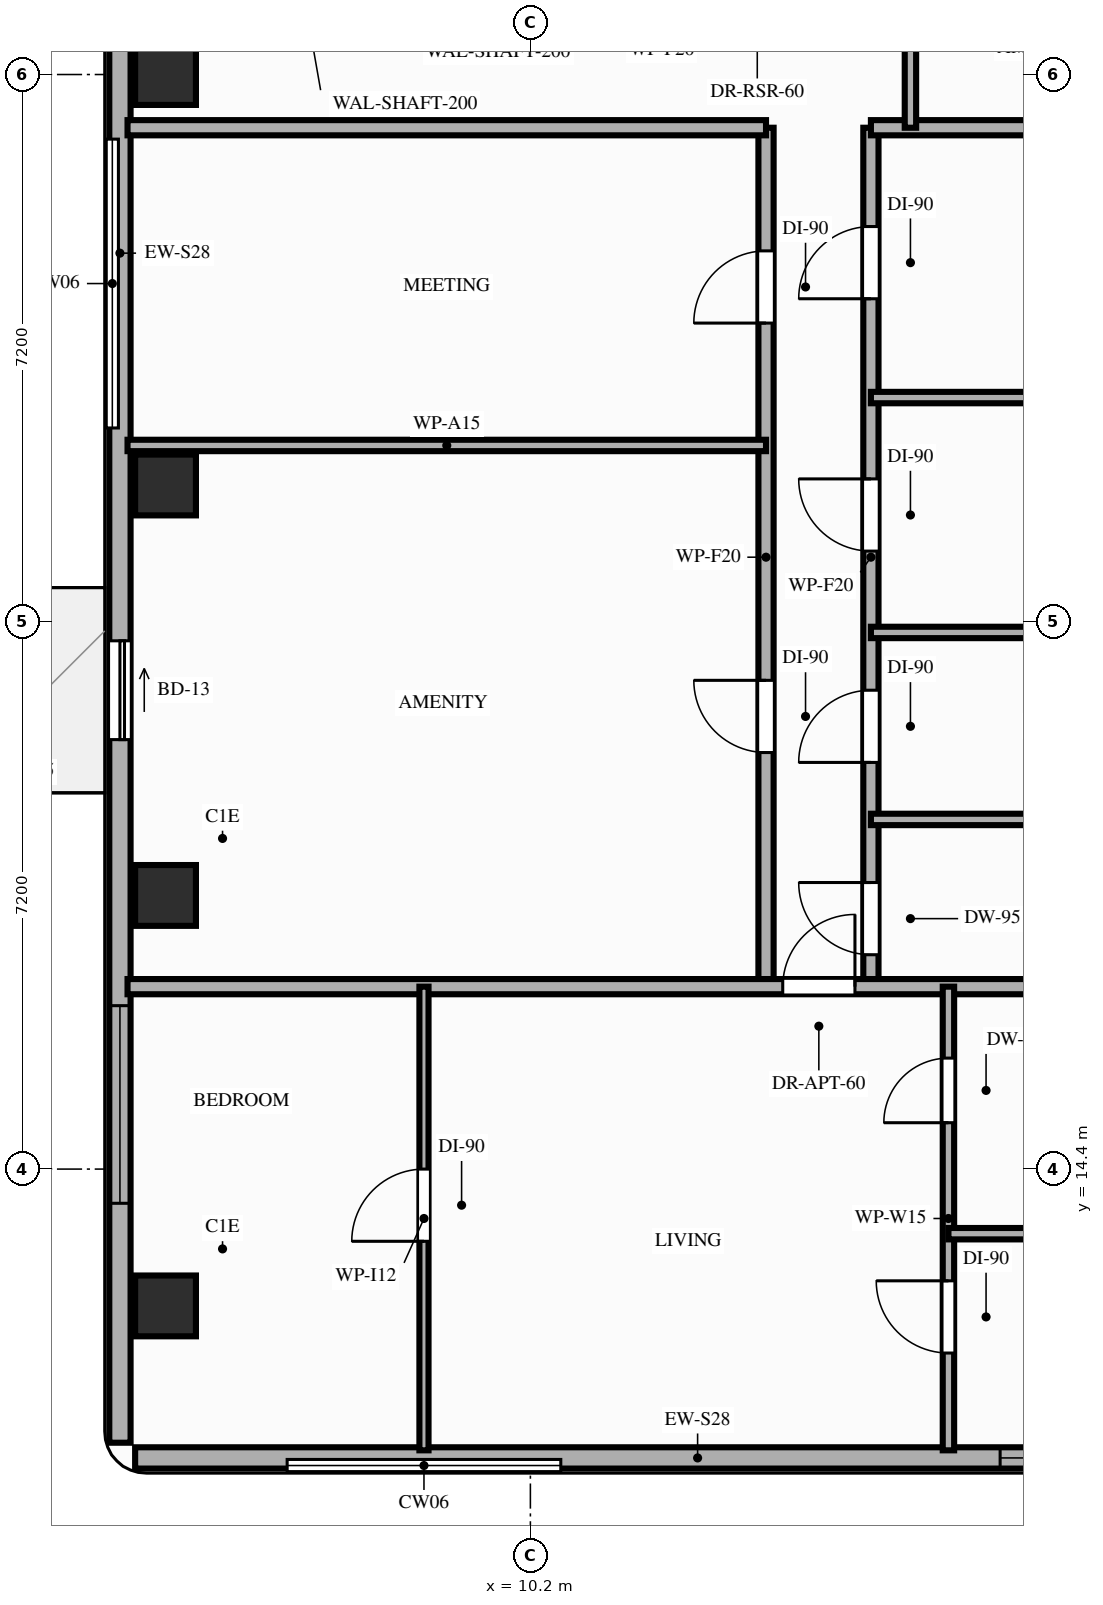
"""IFC4 building model, lengths in metres.
Left out: names, types, materials, properties, quantities, classifications, styles, units other than length and angle.
Written with IfcOpenShell. Run it as: python <this file> out.ifc"""

import sys

from ifc_helpers import new_model, si_unit, direction, frame, frame_2d, origin, origin_2d, place, context, subcontext, project, spatial, rectangle, extrude, element, fill, save


model = new_model("IFC4")
c1 = context("Model", 3, precision=1e-05, world=origin(), true_north=direction((0.0, 1.0)))
c2 = subcontext(c1, "Body", "Model", "MODEL_VIEW")
j1 = project(units=[si_unit("LENGTHUNIT", "METRE"), si_unit("PLANEANGLEUNIT", "RADIAN")], contexts=[c1])
p1 = place(None, origin())
s1 = spatial("IfcSite", under=j1, at=p1, CompositionType="ELEMENT")
p2 = place(p1, origin())
s2 = spatial("IfcBuilding", under=s1, at=p2, CompositionType="ELEMENT")
p3 = place(p2, frame((0.0, 0.0, 240.8)))
s3 = spatial("IfcBuildingStorey", under=s2, at=p3, CompositionType="ELEMENT", Elevation=240.8)
for number, where, z_axis, x_axis in (
    (1, (5.4, 12.6, 0.0), (0.0, 0.0, 1.0), (1.0, 0.0, 0.0)),
    (2, (5.4, 18.0, 0.0), (0.0, 0.0, 1.0), (1.0, 0.0, 0.0)),
    (3, (5.4, 23.4, 0.0), (0.0, 0.0, 1.0), (1.0, 0.0, 0.0)),
    (4, (5.4, 28.8, 0.0), (0.0, 0.0, 1.0), (1.0, 0.0, 0.0)),
):
    element("IfcColumn", number, at=place(p3, frame(where, z_axis=z_axis, x_axis=x_axis)), inside=s3, PredefinedType="COLUMN", context=c2, shape_type="SweptSolid", body=[
        extrude(rectangle(XDim=0.8, YDim=0.8, at=origin_2d()), origin(), (0.0, 0.0, 1.0), 3.2),
    ])
p4 = place(p3, frame((5.0, 10.6, 0.0), z_axis=(0.0, 0.0, 1.0), x_axis=(1.0, 0.0, 0.0)))
e5 = element("IfcWall", 5, at=p4, inside=s3, PredefinedType="STANDARD", context=c2, shape_type="SweptSolid", body=[
    extrude(rectangle(XDim=14.8, YDim=0.28, at=frame_2d((7.4, 0.0))), origin(), (0.0, 0.0, 1.0), 3.02),
])
p5 = place(p4, frame((11.38, 0.0, 0.85)))
e6 = element("IfcOpeningElement", 6, at=p5, cuts=e5, PredefinedType="OPENING", context=c2, shape_type="SweptSolid", body=[
    extrude(rectangle(XDim=2.6, YDim=1.92, at=frame_2d((1.3, 0.96))), frame((0.0, 0.15, 0.0), z_axis=(0.0, -1.0, 0.0), x_axis=(1.0, 0.0, 0.0)), (0.0, 0.0, 1.0), 0.3),
])
p6 = place(p3, frame((4.8, 42.1, 0.0), z_axis=(0.0, 0.0, 1.0), x_axis=(0.0, -1.0, 0.0)))
e7 = element("IfcWall", 7, at=p6, inside=s3, PredefinedType="STANDARD", context=c2, shape_type="SweptSolid", body=[
    extrude(rectangle(XDim=31.3, YDim=0.28, at=frame_2d((15.65, 0.0))), origin(), (0.0, 0.0, 1.0), 2.71),
])
p7 = place(p6, frame((20.75, 0.0, 0.0)))
e8 = element("IfcOpeningElement", 8, at=p7, cuts=e7, PredefinedType="OPENING", context=c2, shape_type="SweptSolid", body=[
    extrude(rectangle(XDim=1.3, YDim=2.08, at=frame_2d((0.65, 1.04))), frame((0.0, 0.15, 0.0), z_axis=(0.0, -1.0, 0.0), x_axis=(1.0, 0.0, 0.0)), (0.0, 0.0, 1.0), 0.3),
])
p8 = place(p6, frame((25.55, 0.0, 0.85)))
e9 = element("IfcOpeningElement", 9, at=p8, cuts=e7, PredefinedType="OPENING", context=c2, shape_type="SweptSolid", body=[
    extrude(rectangle(XDim=2.6, YDim=1.61, at=frame_2d((1.3, 0.805))), frame((0.0, 0.15, 0.0), z_axis=(0.0, -1.0, 0.0), x_axis=(1.0, 0.0, 0.0)), (0.0, 0.0, 1.0), 0.3),
])
p9 = place(p6, frame((9.5, 0.0, 0.85)))
e10 = element("IfcOpeningElement", 10, at=p9, cuts=e7, PredefinedType="OPENING", context=c2, shape_type="SweptSolid", body=[
    extrude(rectangle(XDim=2.6, YDim=1.61, at=frame_2d((1.3, 0.805))), frame((0.0, 0.15, 0.0), z_axis=(0.0, -1.0, 0.0), x_axis=(1.0, 0.0, 0.0)), (0.0, 0.0, 1.0), 0.3),
])
p10 = place(p6, frame((3.4, 0.0, 0.85)))
e11 = element("IfcOpeningElement", 11, at=p10, cuts=e7, PredefinedType="OPENING", context=c2, shape_type="SweptSolid", body=[
    extrude(rectangle(XDim=2.6, YDim=1.61, at=frame_2d((1.3, 0.805))), frame((0.0, 0.15, 0.0), z_axis=(0.0, -1.0, 0.0), x_axis=(1.0, 0.0, 0.0)), (0.0, 0.0, 1.0), 0.3),
])
p11 = place(p3, frame((13.3, 16.8, 0.0), z_axis=(0.0, 0.0, 1.0), x_axis=(0.0, 1.0, 0.0)))
e12 = element("IfcWall", 12, at=p11, inside=s3, PredefinedType="PARTITIONING", context=c2, shape_type="SweptSolid", body=[
    extrude(rectangle(XDim=11.3, YDim=0.2, at=frame_2d((5.65, 0.0))), origin(), (0.0, 0.0, 1.0), 2.55),
])
p12 = place(p11, frame((3.08, 0.0, 0.0)))
e13 = element("IfcOpeningElement", 13, at=p12, cuts=e12, PredefinedType="OPENING", context=c2, shape_type="SweptSolid", body=[
    extrude(rectangle(XDim=0.95, YDim=2.15, at=frame_2d((0.475, 1.075))), frame((0.0, 0.11, 0.0), z_axis=(0.0, -1.0, 0.0), x_axis=(1.0, 0.0, 0.0)), (0.0, 0.0, 1.0), 0.22),
])
p13 = place(p11, frame((8.73, 0.0, 0.0)))
e14 = element("IfcOpeningElement", 14, at=p13, cuts=e12, PredefinedType="OPENING", context=c2, shape_type="SweptSolid", body=[
    extrude(rectangle(XDim=0.95, YDim=2.15, at=frame_2d((0.475, 1.075))), frame((0.0, 0.11, 0.0), z_axis=(0.0, -1.0, 0.0), x_axis=(1.0, 0.0, 0.0)), (0.0, 0.0, 1.0), 0.22),
])
p14 = place(p3, frame((14.68, 16.8, 0.0), z_axis=(0.0, 0.0, 1.0), x_axis=(0.0, 1.0, 0.0)))
e15 = element("IfcWall", 15, at=p14, inside=s3, PredefinedType="PARTITIONING", context=c2, shape_type="SweptSolid", body=[
    extrude(rectangle(XDim=11.3, YDim=0.2, at=frame_2d((5.65, 0.0))), origin(), (0.0, 0.0, 1.0), 2.55),
])
p15 = place(p14, frame((0.42, 0.0, 0.0)))
e16 = element("IfcOpeningElement", 16, at=p15, cuts=e15, PredefinedType="OPENING", context=c2, shape_type="SweptSolid", body=[
    extrude(rectangle(XDim=0.95, YDim=2.1, at=frame_2d((0.475, 1.05))), frame((0.0, 0.11, 0.0), z_axis=(0.0, -1.0, 0.0), x_axis=(1.0, 0.0, 0.0)), (0.0, 0.0, 1.0), 0.22),
])
p16 = place(p14, frame((2.95, 0.0, 0.0)))
e17 = element("IfcOpeningElement", 17, at=p16, cuts=e15, PredefinedType="OPENING", context=c2, shape_type="SweptSolid", body=[
    extrude(rectangle(XDim=0.95, YDim=2.15, at=frame_2d((0.475, 1.075))), frame((0.0, 0.11, 0.0), z_axis=(0.0, -1.0, 0.0), x_axis=(1.0, 0.0, 0.0)), (0.0, 0.0, 1.0), 0.22),
])
p17 = place(p14, frame((5.73, 0.0, 0.0)))
e18 = element("IfcOpeningElement", 18, at=p17, cuts=e15, PredefinedType="OPENING", context=c2, shape_type="SweptSolid", body=[
    extrude(rectangle(XDim=0.95, YDim=2.15, at=frame_2d((0.475, 1.075))), frame((0.0, 0.11, 0.0), z_axis=(0.0, -1.0, 0.0), x_axis=(1.0, 0.0, 0.0)), (0.0, 0.0, 1.0), 0.22),
])
p18 = place(p14, frame((9.05, 0.0, 0.0)))
e19 = element("IfcOpeningElement", 19, at=p18, cuts=e15, PredefinedType="OPENING", context=c2, shape_type="SweptSolid", body=[
    extrude(rectangle(XDim=0.95, YDim=2.15, at=frame_2d((0.475, 1.075))), frame((0.0, 0.11, 0.0), z_axis=(0.0, -1.0, 0.0), x_axis=(1.0, 0.0, 0.0)), (0.0, 0.0, 1.0), 0.22),
])
p19 = place(p3, frame((4.9, 16.8, 0.0), z_axis=(0.0, 0.0, 1.0), x_axis=(1.0, 0.0, 0.0)))
e20 = element("IfcWall", 20, at=p19, inside=s3, PredefinedType="PARTITIONING", context=c2, shape_type="SweptSolid", body=[
    extrude(rectangle(XDim=15.0, YDim=0.2, at=frame_2d((7.5, 0.0))), origin(), (0.0, 0.0, 1.0), 2.55),
])
p20 = place(p19, frame((8.62, 0.0, 0.0)))
e21 = element("IfcOpeningElement", 21, at=p20, cuts=e20, PredefinedType="OPENING", context=c2, shape_type="SweptSolid", body=[
    extrude(rectangle(XDim=0.95, YDim=2.15, at=frame_2d((0.475, 1.075))), frame((0.0, 0.11, 0.0), z_axis=(0.0, -1.0, 0.0), x_axis=(1.0, 0.0, 0.0)), (0.0, 0.0, 1.0), 0.22),
])
p21 = place(p3, frame((4.9, 28.1, 0.0), z_axis=(0.0, 0.0, 1.0), x_axis=(1.0, 0.0, 0.0)))
e22 = element("IfcWall", 22, at=p21, inside=s3, PredefinedType="PARTITIONING", context=c2, shape_type="SweptSolid", body=[
    extrude(rectangle(XDim=8.4, YDim=0.2, at=frame_2d((4.2, 0.0))), origin(), (0.0, 0.0, 1.0), 2.55),
])
p22 = place(p3, frame((14.68, 28.1, 0.0), z_axis=(0.0, 0.0, 1.0), x_axis=(1.0, 0.0, 0.0)))
e23 = element("IfcWall", 23, at=p22, inside=s3, PredefinedType="PARTITIONING", context=c2, shape_type="SweptSolid", body=[
    extrude(rectangle(XDim=5.22, YDim=0.2, at=frame_2d((2.61, 0.0))), origin(), (0.0, 0.0, 1.0), 2.55),
])
p23 = place(p3, frame((15.2, 28.1, 0.0), z_axis=(0.0, 0.0, 1.0), x_axis=(0.0, 1.0, 0.0)))
e24 = element("IfcWall", 24, at=p23, inside=s3, PredefinedType="PARTITIONING", context=c2, shape_type="SweptSolid", body=[
    extrude(rectangle(XDim=3.05, YDim=0.15, at=frame_2d((1.525, 0.0))), origin(), (0.0, 0.0, 1.0), 2.55),
])
p24 = place(p3, frame((8.8, 10.7, 0.0), z_axis=(0.0, 0.0, 1.0), x_axis=(0.0, 1.0, 0.0)))
e25 = element("IfcWall", 25, at=p24, inside=s3, PredefinedType="PARTITIONING", context=c2, shape_type="SweptSolid", body=[
    extrude(rectangle(XDim=6.1, YDim=0.12, at=frame_2d((3.05, 0.0))), origin(), (0.0, 0.0, 1.0), 2.55),
])
p25 = place(p24, frame((2.75, 0.0, 0.0)))
e26 = element("IfcOpeningElement", 26, at=p25, cuts=e25, PredefinedType="OPENING", context=c2, shape_type="SweptSolid", body=[
    extrude(rectangle(XDim=0.95, YDim=2.15, at=frame_2d((0.475, 1.075))), frame((0.0, 0.07, 0.0), z_axis=(0.0, -1.0, 0.0), x_axis=(1.0, 0.0, 0.0)), (0.0, 0.0, 1.0), 0.14),
])
p26 = place(p3, frame((15.7, 10.7, 0.0), z_axis=(0.0, 0.0, 1.0), x_axis=(0.0, 1.0, 0.0)))
e27 = element("IfcWall", 27, at=p26, inside=s3, PredefinedType="PARTITIONING", context=c2, shape_type="SweptSolid", body=[
    extrude(rectangle(XDim=6.1, YDim=0.15, at=frame_2d((3.05, 0.0))), origin(), (0.0, 0.0, 1.0), 2.55),
])
p27 = place(p26, frame((1.28, 0.0, 0.0)))
e28 = element("IfcOpeningElement", 28, at=p27, cuts=e27, PredefinedType="OPENING", context=c2, shape_type="SweptSolid", body=[
    extrude(rectangle(XDim=0.95, YDim=2.15, at=frame_2d((0.475, 1.075))), frame((0.0, 0.085, 0.0), z_axis=(0.0, -1.0, 0.0), x_axis=(1.0, 0.0, 0.0)), (0.0, 0.0, 1.0), 0.17),
])
p28 = place(p26, frame((4.31, 0.0, 0.0)))
e29 = element("IfcOpeningElement", 29, at=p28, cuts=e27, PredefinedType="OPENING", context=c2, shape_type="SweptSolid", body=[
    extrude(rectangle(XDim=0.85, YDim=2.1, at=frame_2d((0.425, 1.05))), frame((0.0, 0.085, 0.0), z_axis=(0.0, -1.0, 0.0), x_axis=(1.0, 0.0, 0.0)), (0.0, 0.0, 1.0), 0.17),
])
p29 = place(p3, frame((15.7, 13.55, 0.0), z_axis=(0.0, 0.0, 1.0), x_axis=(1.0, 0.0, 0.0)))
e30 = element("IfcWall", 30, at=p29, inside=s3, PredefinedType="PARTITIONING", context=c2, shape_type="SweptSolid", body=[
    extrude(rectangle(XDim=4.2, YDim=0.15, at=frame_2d((2.1, 0.0))), origin(), (0.0, 0.0, 1.0), 2.55),
])
p30 = place(p3, frame((4.9, 23.92, 0.0), z_axis=(0.0, 0.0, 1.0), x_axis=(1.0, 0.0, 0.0)))
e31 = element("IfcWall", 31, at=p30, inside=s3, PredefinedType="PARTITIONING", context=c2, shape_type="SweptSolid", body=[
    extrude(rectangle(XDim=8.4, YDim=0.15, at=frame_2d((4.2, 0.0))), origin(), (0.0, 0.0, 1.0), 2.55),
])
for number, where, z_axis, x_axis in (
    (32, (14.68, 19.0, 0.0), (0.0, 0.0, 1.0), (1.0, 0.0, 0.0)),
    (33, (14.68, 21.46, 0.0), (0.0, 0.0, 1.0), (1.0, 0.0, 0.0)),
    (34, (14.68, 24.55, 0.0), (0.0, 0.0, 1.0), (1.0, 0.0, 0.0)),
):
    element("IfcWall", number, at=place(p3, frame(where, z_axis=z_axis, x_axis=x_axis)), inside=s3, PredefinedType="PARTITIONING", context=c2, shape_type="SweptSolid", body=[
        extrude(rectangle(XDim=5.22, YDim=0.15, at=frame_2d((2.61, 0.0))), origin(), (0.0, 0.0, 1.0), 2.55),
    ])
p31 = place(p7, origin())
e35 = element("IfcDoor", 35, at=p31, inside=s3, OperationType="SLIDING_TO_LEFT", PredefinedType="DOOR", context=c2, shape_type="SweptSolid", body=[
    extrude(rectangle(XDim=1.3, YDim=2.08, at=frame_2d((0.65, 1.04))), frame((0.0, 0.025, 0.0), z_axis=(0.0, -1.0, 0.0), x_axis=(1.0, 0.0, 0.0)), (0.0, 0.0, 1.0), 0.05),
])
fill(e8, e35)
p32 = place(p5, origin())
e36 = element("IfcWindow", 36, at=p32, inside=s3, PartitioningType="SINGLE_PANEL", PredefinedType="WINDOW", context=c2, shape_type="SweptSolid", body=[
    extrude(rectangle(XDim=2.6, YDim=1.92, at=frame_2d((1.3, 0.96))), frame((0.0, 0.03, 0.0), z_axis=(0.0, -1.0, 0.0), x_axis=(1.0, 0.0, 0.0)), (0.0, 0.0, 1.0), 0.06),
])
fill(e6, e36)
p33 = place(p8, origin())
e37 = element("IfcWindow", 37, at=p33, inside=s3, PartitioningType="SINGLE_PANEL", PredefinedType="WINDOW", context=c2, shape_type="SweptSolid", body=[
    extrude(rectangle(XDim=2.6, YDim=1.61, at=frame_2d((1.3, 0.805))), frame((0.0, 0.03, 0.0), z_axis=(0.0, -1.0, 0.0), x_axis=(1.0, 0.0, 0.0)), (0.0, 0.0, 1.0), 0.06),
])
fill(e9, e37)
p34 = place(p20, origin())
e38 = element("IfcDoor", 38, at=p34, inside=s3, OperationType="SINGLE_SWING_RIGHT", PredefinedType="DOOR", context=c2, shape_type="SweptSolid", body=[
    extrude(rectangle(XDim=0.95, YDim=2.15, at=frame_2d((0.475, 1.075))), frame((0.0, 0.025, 0.0), z_axis=(0.0, -1.0, 0.0), x_axis=(1.0, 0.0, 0.0)), (0.0, 0.0, 1.0), 0.05),
])
fill(e21, e38)
p35 = place(p25, origin())
e39 = element("IfcDoor", 39, at=p35, inside=s3, OperationType="SINGLE_SWING_LEFT", PredefinedType="DOOR", context=c2, shape_type="SweptSolid", body=[
    extrude(rectangle(XDim=0.95, YDim=2.15, at=frame_2d((0.475, 1.075))), frame((0.0, 0.025, 0.0), z_axis=(0.0, -1.0, 0.0), x_axis=(1.0, 0.0, 0.0)), (0.0, 0.0, 1.0), 0.05),
])
fill(e26, e39)
p36 = place(p27, origin())
e40 = element("IfcDoor", 40, at=p36, inside=s3, OperationType="SINGLE_SWING_RIGHT", PredefinedType="DOOR", context=c2, shape_type="SweptSolid", body=[
    extrude(rectangle(XDim=0.95, YDim=2.15, at=frame_2d((0.475, 1.075))), frame((0.0, 0.025, 0.0), z_axis=(0.0, -1.0, 0.0), x_axis=(1.0, 0.0, 0.0)), (0.0, 0.0, 1.0), 0.05),
])
fill(e28, e40)
p37 = place(p28, origin())
e41 = element("IfcDoor", 41, at=p37, inside=s3, OperationType="SINGLE_SWING_LEFT", PredefinedType="DOOR", context=c2, shape_type="SweptSolid", body=[
    extrude(rectangle(XDim=0.85, YDim=2.1, at=frame_2d((0.425, 1.05))), frame((0.0, 0.025, 0.0), z_axis=(0.0, -1.0, 0.0), x_axis=(1.0, 0.0, 0.0)), (0.0, 0.0, 1.0), 0.05),
])
fill(e29, e41)
p38 = place(p12, origin())
e42 = element("IfcDoor", 42, at=p38, inside=s3, OperationType="SINGLE_SWING_RIGHT", PredefinedType="DOOR", context=c2, shape_type="SweptSolid", body=[
    extrude(rectangle(XDim=0.95, YDim=2.15, at=frame_2d((0.475, 1.075))), frame((0.0, 0.025, 0.0), z_axis=(0.0, -1.0, 0.0), x_axis=(1.0, 0.0, 0.0)), (0.0, 0.0, 1.0), 0.05),
])
fill(e13, e42)
p39 = place(p13, origin())
e43 = element("IfcDoor", 43, at=p39, inside=s3, OperationType="SINGLE_SWING_LEFT", PredefinedType="DOOR", context=c2, shape_type="SweptSolid", body=[
    extrude(rectangle(XDim=0.95, YDim=2.15, at=frame_2d((0.475, 1.075))), frame((0.0, 0.025, 0.0), z_axis=(0.0, -1.0, 0.0), x_axis=(1.0, 0.0, 0.0)), (0.0, 0.0, 1.0), 0.05),
])
fill(e14, e43)
p40 = place(p15, origin())
e44 = element("IfcDoor", 44, at=p40, inside=s3, OperationType="SINGLE_SWING_RIGHT", PredefinedType="DOOR", context=c2, shape_type="SweptSolid", body=[
    extrude(rectangle(XDim=0.95, YDim=2.1, at=frame_2d((0.475, 1.05))), frame((0.0, 0.025, 0.0), z_axis=(0.0, -1.0, 0.0), x_axis=(1.0, 0.0, 0.0)), (0.0, 0.0, 1.0), 0.05),
])
fill(e16, e44)
p41 = place(p16, origin())
e45 = element("IfcDoor", 45, at=p41, inside=s3, OperationType="SINGLE_SWING_LEFT", PredefinedType="DOOR", context=c2, shape_type="SweptSolid", body=[
    extrude(rectangle(XDim=0.95, YDim=2.15, at=frame_2d((0.475, 1.075))), frame((0.0, 0.025, 0.0), z_axis=(0.0, -1.0, 0.0), x_axis=(1.0, 0.0, 0.0)), (0.0, 0.0, 1.0), 0.05),
])
fill(e17, e45)
p42 = place(p17, origin())
e46 = element("IfcDoor", 46, at=p42, inside=s3, OperationType="SINGLE_SWING_RIGHT", PredefinedType="DOOR", context=c2, shape_type="SweptSolid", body=[
    extrude(rectangle(XDim=0.95, YDim=2.15, at=frame_2d((0.475, 1.075))), frame((0.0, 0.025, 0.0), z_axis=(0.0, -1.0, 0.0), x_axis=(1.0, 0.0, 0.0)), (0.0, 0.0, 1.0), 0.05),
])
fill(e18, e46)
p43 = place(p18, origin())
e47 = element("IfcDoor", 47, at=p43, inside=s3, OperationType="SINGLE_SWING_LEFT", PredefinedType="DOOR", context=c2, shape_type="SweptSolid", body=[
    extrude(rectangle(XDim=0.95, YDim=2.15, at=frame_2d((0.475, 1.075))), frame((0.0, 0.025, 0.0), z_axis=(0.0, -1.0, 0.0), x_axis=(1.0, 0.0, 0.0)), (0.0, 0.0, 1.0), 0.05),
])
fill(e19, e47)
save(model, sys.argv[1])
